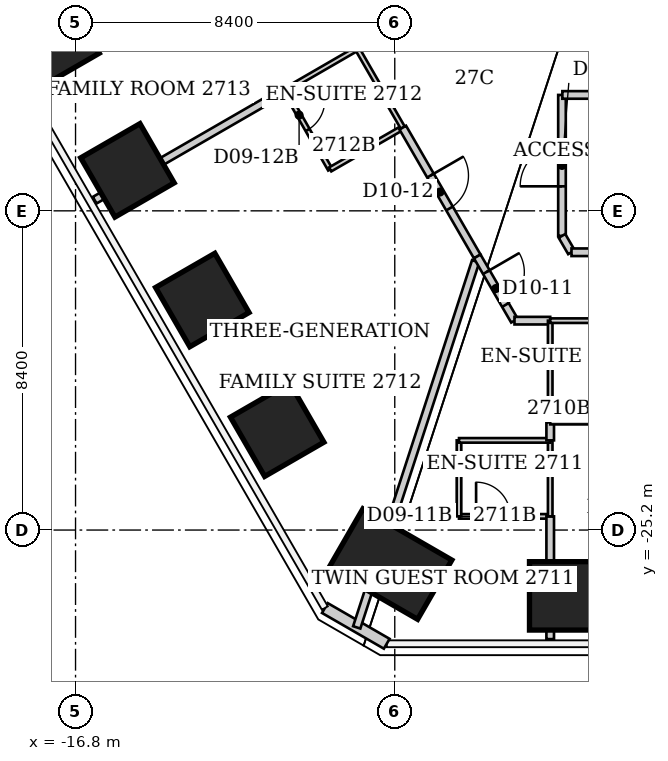
"""IFC4 building model, lengths in metres.
Left out: names, types, materials, properties, quantities, classifications, styles, units other than length and angle.
Written with IfcOpenShell. Run it as: python <this file> out.ifc"""

import sys

from ifc_helpers import new_model, si_unit, direction, frame, frame_2d, origin, origin_2d, place, context, subcontext, project, spatial, rectangle, extrude, element, fill, save


model = new_model("IFC4")
c1 = context("Model", 3, precision=1e-05, world=origin(), true_north=direction((0.0, 1.0)))
c2 = subcontext(c1, "Body", "Model", "MODEL_VIEW")
j1 = project(units=[si_unit("LENGTHUNIT", "METRE"), si_unit("PLANEANGLEUNIT", "RADIAN")], contexts=[c1])
p1 = place(None, origin())
s1 = spatial("IfcSite", under=j1, at=p1, CompositionType="ELEMENT")
p2 = place(p1, origin())
s2 = spatial("IfcBuilding", under=s1, at=p2, CompositionType="ELEMENT")
p3 = place(p2, frame((0.0, 0.0, 112.0)))
s3 = spatial("IfcBuildingStorey", under=s2, at=p3, CompositionType="ELEMENT", Elevation=112.0)
p4 = place(p3, frame((-3.955, -26.932, 0.0), z_axis=(0.0, 0.0, 1.0), x_axis=(0.0, -1.0, 0.0)))
e1 = element("IfcColumn", 1, at=p4, inside=s3, PredefinedType="COLUMN", context=c2, shape_type="SweptSolid", body=[
    extrude(rectangle(XDim=1.8, YDim=1.8, at=origin_2d()), origin(), (0.0, 0.0, 1.0), 3.8),
])
p5 = place(p3, frame((-8.518, -26.094, 0.0), z_axis=(0.0, 0.0, 1.0), x_axis=(-0.5, -0.866025403784, 0.0)))
e2 = element("IfcColumn", 2, at=p5, inside=s3, PredefinedType="COLUMN", context=c2, shape_type="SweptSolid", body=[
    extrude(rectangle(XDim=1.8, YDim=2.7, at=origin_2d()), origin(), (0.0, 0.0, 1.0), 3.8),
])
for number, where, z_axis, x_axis in (
    (3, (-11.494, -22.559, 0.0), (0.0, 0.0, 1.0), (-0.866, -0.5, 0.0)),
    (4, (-13.464, -19.147, 0.0), (0.0, 0.0, 1.0), (-0.866, -0.5, 0.0)),
    (5, (-15.434, -15.735, 0.0), (0.0, 0.0, 1.0), (-0.866, -0.5, 0.0)),
    (6, (-17.404, -12.323, 0.0), (0.0, 0.0, 1.0), (-0.866, -0.5, 0.0)),
):
    element("IfcColumn", number, at=place(p3, frame(where, z_axis=z_axis, x_axis=x_axis)), inside=s3, PredefinedType="COLUMN", context=c2, shape_type="SweptSolid", body=[
        extrude(rectangle(XDim=1.8, YDim=1.8, at=origin_2d()), origin(), (0.0, 0.0, 1.0), 3.8),
    ])
p6 = place(p3, frame((-8.611, -28.192, 0.0), z_axis=(0.0, 0.0, 1.0), x_axis=(-0.866045024864, 0.499966013754, 0.0)))
e7 = element("IfcWall", 7, at=p6, inside=s3, PredefinedType="SOLIDWALL", context=c2, shape_type="SweptSolid", body=[
    extrude(rectangle(XDim=1.88, YDim=0.3, at=frame_2d((0.94, 0.0))), origin(), (0.0, 0.0, 1.0), 3.64),
])
p7 = place(p3, frame((-16.296, -16.52, 0.0), z_axis=(0.0, 0.0, 1.0), x_axis=(0.866035778077, 0.499982030767, 0.0)))
e8 = element("IfcWall", 8, at=p7, inside=s3, PredefinedType="PARTITIONING", context=c2, shape_type="SweptSolid", body=[
    extrude(rectangle(XDim=5.781, YDim=0.2, at=frame_2d((2.89, 0.0))), origin(), (0.0, 0.0, 1.0), 3.64),
])
p8 = place(p3, frame((-11.29, -13.63, 0.0), z_axis=(0.0, 0.0, 1.0), x_axis=(0.496555799318, -0.868004803076, 0.0)))
e9 = element("IfcWall", 9, at=p8, inside=s3, PredefinedType="PARTITIONING", context=c2, shape_type="SweptSolid", body=[
    extrude(rectangle(XDim=2.396, YDim=0.12, at=frame_2d((1.198, 0.0))), origin(), (0.0, 0.0, 1.0), 3.64),
])
p9 = place(p8, frame((0.3, 0.0, 0.0)))
e10 = element("IfcOpeningElement", 10, at=p9, cuts=e9, PredefinedType="OPENING", context=c2, shape_type="SweptSolid", body=[
    extrude(rectangle(XDim=0.9, YDim=2.03, at=frame_2d((0.45, 1.015))), frame((0.0, 0.06, 0.0), z_axis=(0.0, -1.0, 0.0), x_axis=(1.0, 0.0, 0.0)), (0.0, 0.0, 1.0), 0.12),
])
p10 = place(p3, frame((-11.29, -13.63, 0.0), z_axis=(0.0, 0.0, 1.0), x_axis=(0.865444051011, 0.501005583372, 0.0)))
e11 = element("IfcWall", 11, at=p10, inside=s3, PredefinedType="PARTITIONING", context=c2, shape_type="SweptSolid", body=[
    extrude(rectangle(XDim=2.195, YDim=0.12, at=frame_2d((1.098, 0.0))), origin(), (0.0, 0.0, 1.0), 3.64),
])
p11 = place(p3, frame((-10.1, -15.71, 0.0), z_axis=(0.0, 0.0, 1.0), x_axis=(0.866609394187, 0.498987132006, 0.0)))
e12 = element("IfcWall", 12, at=p11, inside=s3, PredefinedType="PARTITIONING", context=c2, shape_type="SweptSolid", body=[
    extrude(rectangle(XDim=2.204, YDim=0.12, at=frame_2d((1.102, 0.0))), origin(), (0.0, 0.0, 1.0), 3.64),
])
p12 = place(p3, frame((-9.401, -27.761, 0.0), z_axis=(0.0, 0.0, 1.0), x_axis=(0.308922010647, 0.951087373135, 0.0)))
e13 = element("IfcWall", 13, at=p12, inside=s3, PredefinedType="PARTITIONING", context=c2, shape_type="SweptSolid", body=[
    extrude(rectangle(XDim=10.128, YDim=0.2, at=frame_2d((5.064, 0.0))), origin(), (0.0, 0.0, 1.0), 3.64),
])
p13 = place(p3, frame((-9.39, -12.53, 0.0), z_axis=(0.0, 0.0, 1.0), x_axis=(0.499737123639, -0.866177122335, 0.0)))
e14 = element("IfcWall", 14, at=p13, inside=s3, PredefinedType="PARTITIONING", context=c2, shape_type="SweptSolid", body=[
    extrude(rectangle(XDim=2.401, YDim=0.12, at=frame_2d((1.201, 0.0))), origin(), (0.0, 0.0, 1.0), 3.64),
])
p14 = place(p3, frame((-8.19, -14.61, 0.0), z_axis=(0.0, 0.0, 1.0), x_axis=(0.50053726643, -0.86571499058, 0.0)))
e15 = element("IfcWall", 15, at=p14, inside=s3, PredefinedType="PARTITIONING", context=c2, shape_type="SweptSolid", body=[
    extrude(rectangle(XDim=3.916, YDim=0.2, at=frame_2d((1.958, 0.0))), origin(), (0.0, 0.0, 1.0), 3.64),
])
p15 = place(p14, frame((1.458, 0.0, 0.0)))
e16 = element("IfcOpeningElement", 16, at=p15, cuts=e15, PredefinedType="OPENING", context=c2, shape_type="SweptSolid", body=[
    extrude(rectangle(XDim=1.0, YDim=2.13, at=frame_2d((0.5, 1.065))), frame((0.0, 0.1, 0.0), z_axis=(0.0, -1.0, 0.0), x_axis=(1.0, 0.0, 0.0)), (0.0, 0.0, 1.0), 0.2),
])
p16 = place(p3, frame((-6.71, -24.84, 0.0), z_axis=(0.0, 0.0, 1.0), x_axis=(1.0, 0.0, 0.0)))
e17 = element("IfcWall", 17, at=p16, inside=s3, PredefinedType="PARTITIONING", context=c2, shape_type="SweptSolid", body=[
    extrude(rectangle(XDim=2.4, YDim=0.12, at=frame_2d((1.2, 0.0))), origin(), (0.0, 0.0, 1.0), 3.64),
])
p17 = place(p16, frame((0.45, 0.0, 0.0)))
e18 = element("IfcOpeningElement", 18, at=p17, cuts=e17, PredefinedType="OPENING", context=c2, shape_type="SweptSolid", body=[
    extrude(rectangle(XDim=0.9, YDim=2.03, at=frame_2d((0.45, 1.015))), frame((0.0, 0.06, 0.0), z_axis=(0.0, -1.0, 0.0), x_axis=(1.0, 0.0, 0.0)), (0.0, 0.0, 1.0), 0.12),
])
p18 = place(p3, frame((-6.71, -22.84, 0.0), z_axis=(0.0, 0.0, 1.0), x_axis=(0.0, -1.0, 0.0)))
e19 = element("IfcWall", 19, at=p18, inside=s3, PredefinedType="PARTITIONING", context=c2, shape_type="SweptSolid", body=[
    extrude(rectangle(XDim=2.0, YDim=0.12, at=frame_2d((1.0, 0.0))), origin(), (0.0, 0.0, 1.0), 3.64),
])
p19 = place(p3, frame((-6.23, -18.0, 0.0), z_axis=(0.0, 0.0, 1.0), x_axis=(0.501647016168, -0.86507240805, 0.0)))
e20 = element("IfcWall", 20, at=p19, inside=s3, PredefinedType="PARTITIONING", context=c2, shape_type="SweptSolid", body=[
    extrude(rectangle(XDim=1.954, YDim=0.2, at=frame_2d((0.977, 0.0))), origin(), (0.0, 0.0, 1.0), 3.64),
])
p20 = place(p19, frame((0.477, 0.0, 0.0)))
e21 = element("IfcOpeningElement", 21, at=p20, cuts=e20, PredefinedType="OPENING", context=c2, shape_type="SweptSolid", body=[
    extrude(rectangle(XDim=1.0, YDim=2.13, at=frame_2d((0.5, 1.065))), frame((0.0, 0.1, 0.0), z_axis=(0.0, -1.0, 0.0), x_axis=(1.0, 0.0, 0.0)), (0.0, 0.0, 1.0), 0.2),
])
p21 = place(p3, frame((-5.25, -19.69, 0.0), z_axis=(0.0, 0.0, 1.0), x_axis=(1.0, 0.0, 0.0)))
e22 = element("IfcWall", 22, at=p21, inside=s3, PredefinedType="PARTITIONING", context=c2, shape_type="SweptSolid", body=[
    extrude(rectangle(XDim=0.94, YDim=0.2, at=frame_2d((0.47, 0.0))), origin(), (0.0, 0.0, 1.0), 3.64),
])
p22 = place(p3, frame((-4.31, -28.07, 0.0), z_axis=(0.0, 0.0, 1.0), x_axis=(0.0, 1.0, 0.0)))
e23 = element("IfcWall", 23, at=p22, inside=s3, PredefinedType="PARTITIONING", context=c2, shape_type="SweptSolid", body=[
    extrude(rectangle(XDim=3.23, YDim=0.2, at=frame_2d((1.615, 0.0))), origin(), (0.0, 0.0, 1.0), 3.64),
])
p23 = place(p3, frame((-4.31, -24.84, 0.0), z_axis=(0.0, 0.0, 1.0), x_axis=(0.0, 1.0, 0.0)))
e24 = element("IfcWall", 24, at=p23, inside=s3, PredefinedType="PARTITIONING", context=c2, shape_type="SweptSolid", body=[
    extrude(rectangle(XDim=2.0, YDim=0.12, at=frame_2d((1.0, 0.0))), origin(), (0.0, 0.0, 1.0), 3.64),
])
p24 = place(p3, frame((-4.31, -22.84, 0.0), z_axis=(0.0, 0.0, 1.0), x_axis=(-1.0, 0.0, 0.0)))
e25 = element("IfcWall", 25, at=p24, inside=s3, PredefinedType="PARTITIONING", context=c2, shape_type="SweptSolid", body=[
    extrude(rectangle(XDim=2.4, YDim=0.12, at=frame_2d((1.2, 0.0))), origin(), (0.0, 0.0, 1.0), 3.64),
])
p25 = place(p3, frame((-4.31, -22.84, 0.0), z_axis=(0.0, 0.0, 1.0), x_axis=(0.0, 1.0, 0.0)))
e26 = element("IfcWall", 26, at=p25, inside=s3, PredefinedType="PARTITIONING", context=c2, shape_type="SweptSolid", body=[
    extrude(rectangle(XDim=0.48, YDim=0.2, at=frame_2d((0.24, 0.0))), origin(), (0.0, 0.0, 1.0), 3.64),
])
p26 = place(p3, frame((-4.31, -22.36, 0.0), z_axis=(0.0, 0.0, 1.0), x_axis=(0.0, 1.0, 0.0)))
e27 = element("IfcWall", 27, at=p26, inside=s3, PredefinedType="PARTITIONING", context=c2, shape_type="SweptSolid", body=[
    extrude(rectangle(XDim=2.67, YDim=0.12, at=frame_2d((1.335, 0.0))), origin(), (0.0, 0.0, 1.0), 3.64),
])
for number, where, z_axis, x_axis in (
    (28, (-4.31, -22.36, 0.0), (0.0, 0.0, 1.0), (1.0, 0.0, 0.0)),
    (29, (-4.31, -19.69, 0.0), (0.0, 0.0, 1.0), (1.0, 0.0, 0.0)),
):
    element("IfcWall", number, at=place(p3, frame(where, z_axis=z_axis, x_axis=x_axis)), inside=s3, PredefinedType="PARTITIONING", context=c2, shape_type="SweptSolid", body=[
        extrude(rectangle(XDim=2.45, YDim=0.12, at=frame_2d((1.225, 0.0))), origin(), (0.0, 0.0, 1.0), 3.64),
    ])
p27 = place(p3, frame((-4.0, -17.46, 0.0), z_axis=(0.0, 0.0, 1.0), x_axis=(0.0, 1.0, 0.0)))
e30 = element("IfcWall", 30, at=p27, inside=s3, PredefinedType="PARTITIONING", context=c2, shape_type="SweptSolid", body=[
    extrude(rectangle(XDim=3.71, YDim=0.2, at=frame_2d((1.855, 0.0))), origin(), (0.0, 0.0, 1.0), 2.878),
])
p28 = place(p27, frame((1.305, 0.0, 0.0)))
e31 = element("IfcOpeningElement", 31, at=p28, cuts=e30, PredefinedType="OPENING", context=c2, shape_type="SweptSolid", body=[
    extrude(rectangle(XDim=1.1, YDim=2.2, at=frame_2d((0.55, 1.1))), frame((0.0, 0.1, 0.0), z_axis=(0.0, -1.0, 0.0), x_axis=(1.0, 0.0, 0.0)), (0.0, 0.0, 1.0), 0.2),
])
p29 = place(p3, frame((-3.99, -13.75, 0.0), z_axis=(0.0, 0.0, 1.0), x_axis=(1.0, 0.0, 0.0)))
e32 = element("IfcWall", 32, at=p29, inside=s3, PredefinedType="PARTITIONING", context=c2, shape_type="SweptSolid", body=[
    extrude(rectangle(XDim=2.79, YDim=0.2, at=frame_2d((1.395, 0.0))), origin(), (0.0, 0.0, 1.0), 3.64),
])
p30 = place(p3, frame((-3.75, -17.89, 0.0), z_axis=(0.0, 0.0, 1.0), x_axis=(-0.502680181512, 0.864472460588, 0.0)))
e33 = element("IfcWall", 33, at=p30, inside=s3, PredefinedType="PARTITIONING", context=c2, shape_type="SweptSolid", body=[
    extrude(rectangle(XDim=0.497, YDim=0.2, at=frame_2d((0.249, 0.0))), origin(), (0.0, 0.0, 1.0), 3.64),
])
p31 = place(p3, frame((-1.2, -17.89, 0.0), z_axis=(0.0, 0.0, 1.0), x_axis=(-1.0, 0.0, 0.0)))
e34 = element("IfcWall", 34, at=p31, inside=s3, PredefinedType="PARTITIONING", context=c2, shape_type="SweptSolid", body=[
    extrude(rectangle(XDim=2.55, YDim=0.2, at=frame_2d((1.275, 0.0))), origin(), (0.0, 0.0, 1.0), 3.64),
])
p32 = place(p20, origin())
e35 = element("IfcDoor", 35, at=p32, inside=s3, OperationType="SINGLE_SWING_LEFT", PredefinedType="DOOR", context=c2, shape_type="SweptSolid", body=[
    extrude(rectangle(XDim=1.0, YDim=2.13, at=frame_2d((0.5, 1.065))), frame((0.0, 0.025, 0.0), z_axis=(0.0, -1.0, 0.0), x_axis=(1.0, 0.0, 0.0)), (0.0, 0.0, 1.0), 0.05),
])
fill(e21, e35)
p33 = place(p17, origin())
e36 = element("IfcDoor", 36, at=p33, inside=s3, OperationType="SINGLE_SWING_LEFT", PredefinedType="DOOR", context=c2, shape_type="SweptSolid", body=[
    extrude(rectangle(XDim=0.9, YDim=2.03, at=frame_2d((0.45, 1.015))), frame((0.0, 0.025, 0.0), z_axis=(0.0, -1.0, 0.0), x_axis=(1.0, 0.0, 0.0)), (0.0, 0.0, 1.0), 0.05),
])
fill(e18, e36)
p34 = place(p15, origin())
e37 = element("IfcDoor", 37, at=p34, inside=s3, OperationType="SINGLE_SWING_LEFT", PredefinedType="DOOR", context=c2, shape_type="SweptSolid", body=[
    extrude(rectangle(XDim=1.0, YDim=2.13, at=frame_2d((0.5, 1.065))), frame((0.0, 0.025, 0.0), z_axis=(0.0, -1.0, 0.0), x_axis=(1.0, 0.0, 0.0)), (0.0, 0.0, 1.0), 0.05),
])
fill(e16, e37)
p35 = place(p9, origin())
e38 = element("IfcDoor", 38, at=p35, inside=s3, OperationType="SINGLE_SWING_LEFT", PredefinedType="DOOR", context=c2, shape_type="SweptSolid", body=[
    extrude(rectangle(XDim=0.9, YDim=2.03, at=frame_2d((0.45, 1.015))), frame((0.0, 0.025, 0.0), z_axis=(0.0, -1.0, 0.0), x_axis=(1.0, 0.0, 0.0)), (0.0, 0.0, 1.0), 0.05),
])
fill(e10, e38)
p36 = place(p28, origin())
e39 = element("IfcDoor", 39, at=p36, inside=s3, OperationType="SINGLE_SWING_LEFT", PredefinedType="DOOR", context=c2, shape_type="SweptSolid", body=[
    extrude(rectangle(XDim=1.1, YDim=2.2, at=frame_2d((0.55, 1.1))), frame((0.0, 0.025, 0.0), z_axis=(0.0, -1.0, 0.0), x_axis=(1.0, 0.0, 0.0)), (0.0, 0.0, 1.0), 0.05),
])
fill(e31, e39)
save(model, sys.argv[1])
